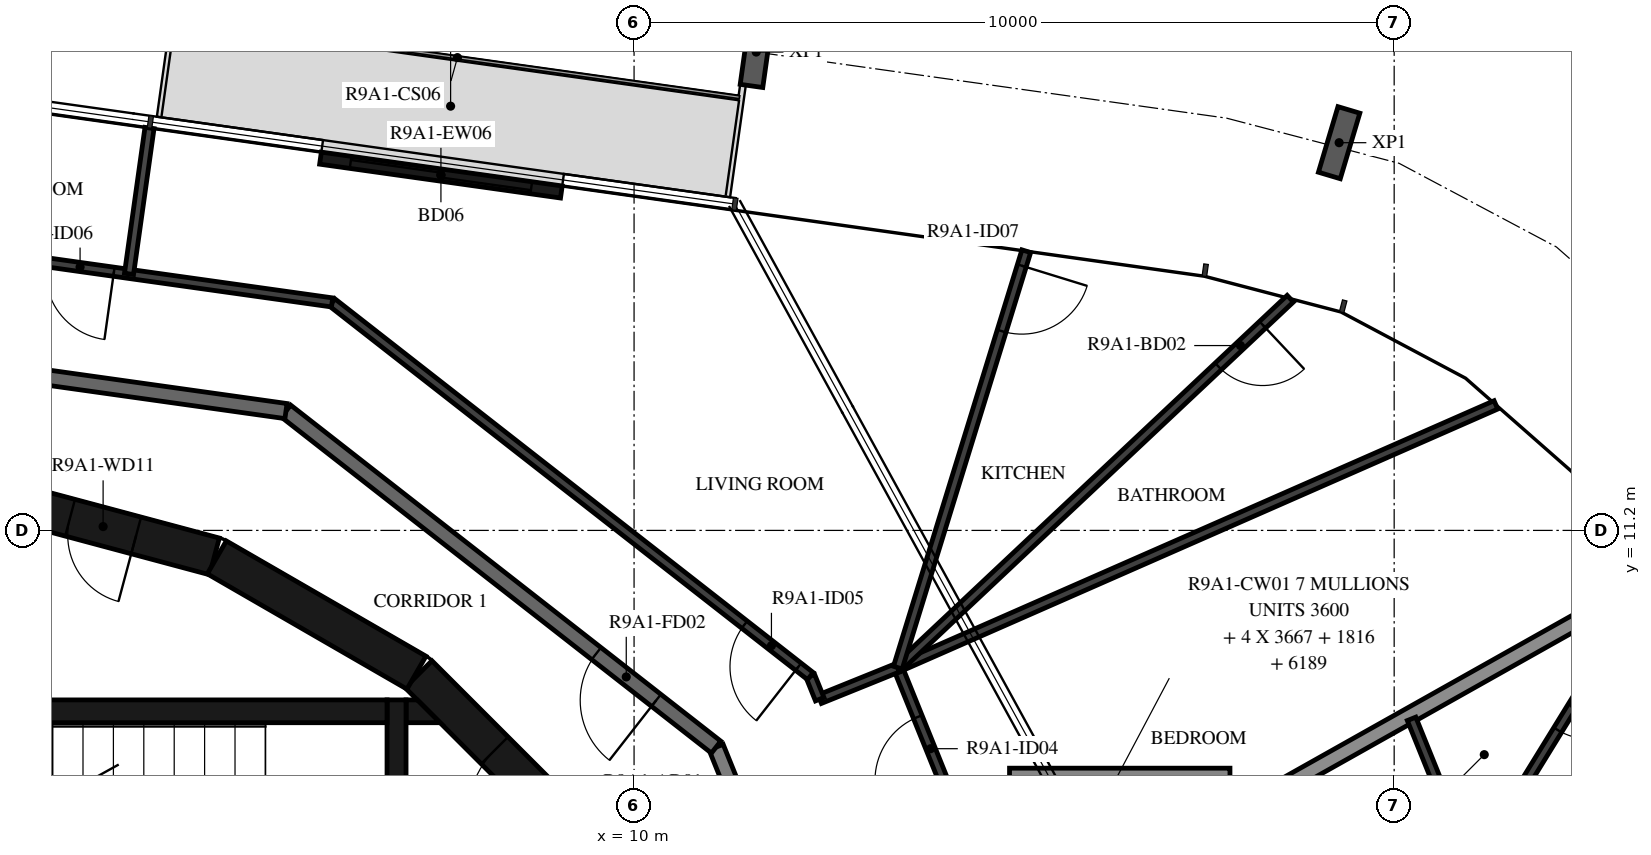
"""IFC4 building model, lengths in metres.
Left out: names, types, materials, properties, quantities, classifications, styles, units other than length and angle.
Written with IfcOpenShell. Run it as: python <this file> out.ifc"""

import sys

from ifc_helpers import new_model, si_unit, direction, frame, frame_2d, origin, origin_2d, place, context, subcontext, project, spatial, polyline, rectangle, i_section, outline, extrude, element, fill, save


model = new_model("IFC4")
c1 = context("Model", 3, precision=1e-05, world=origin(), true_north=direction((0.0, 1.0)))
c2 = subcontext(c1, "Body", "Model", "MODEL_VIEW")
j1 = project(units=[si_unit("LENGTHUNIT", "METRE"), si_unit("PLANEANGLEUNIT", "RADIAN")], contexts=[c1])
p1 = place(None, origin())
s1 = spatial("IfcSite", under=j1, at=p1, CompositionType="ELEMENT")
p2 = place(p1, origin())
s2 = spatial("IfcBuilding", under=s1, at=p2, CompositionType="ELEMENT")
p3 = place(p2, frame((0.0, 0.0, 336.5)))
s3 = spatial("IfcBuildingStorey", under=s2, at=p3, CompositionType="ELEMENT", Elevation=336.5)
for number, where, z_axis, x_axis in (
    (1, (19.276, 16.301, -0.38), (0.0, 0.0, 1.0), (0.958, -0.286, 0.0)),
    (2, (11.607, 17.493, -0.38), (0.0, 0.0, 1.0), (0.99, -0.139, 0.0)),
):
    element("IfcColumn", number, at=place(p3, frame(where, z_axis=z_axis, x_axis=x_axis)), inside=s3, PredefinedType="COLUMN", context=c2, shape_type="SweptSolid", body=[
        extrude(i_section(OverallWidth=0.3, OverallDepth=0.9, WebThickness=0.019, FlangeThickness=0.035, FilletRadius=0.03, at=origin_2d()), origin(), (0.0, 0.0, 1.0), 3.5),
    ])
p4 = place(p3, frame((9.043, 15.652, 0.0), z_axis=(0.0, 0.0, 1.0), x_axis=(-0.990270382149, 0.139156639217, 0.0)))
e3 = element("IfcWall", 3, at=p4, inside=s3, PredefinedType="STANDARD", context=c2, shape_type="SweptSolid", body=[
    extrude(rectangle(XDim=3.2, YDim=0.16, at=frame_2d((1.6, 0.0))), origin(), (0.0, 0.0, 1.0), 3.12),
])
p5 = place(p4, frame((0.4, 0.0, 0.0)))
e4 = element("IfcOpeningElement", 4, at=p5, cuts=e3, PredefinedType="OPENING", context=c2, shape_type="SweptSolid", body=[
    extrude(rectangle(XDim=2.4, YDim=2.4, at=frame_2d((1.2, 1.2))), frame((0.0, 0.09, 0.0), z_axis=(0.0, -1.0, 0.0), x_axis=(1.0, 0.0, 0.0)), (0.0, 0.0, 1.0), 0.18),
])
p6 = place(p3, frame((9.308, 7.164, 0.0), z_axis=(0.0, 0.0, 1.0), x_axis=(-0.707106781187, 0.707106781187, 0.0)))
e5 = element("IfcWall", 5, at=p6, inside=s3, PredefinedType="SHEAR", context=c2, shape_type="SweptSolid", body=[
    extrude(rectangle(XDim=3.032, YDim=0.5, at=frame_2d((1.516, 0.0))), origin(), (0.0, 0.0, 1.0), 3.12),
])
p7 = place(p6, frame((0.416, 0.0, 0.0)))
e6 = element("IfcOpeningElement", 6, at=p7, cuts=e5, PredefinedType="OPENING", context=c2, shape_type="SweptSolid", body=[
    extrude(rectangle(XDim=1.2, YDim=2.1, at=frame_2d((0.6, 1.05))), frame((0.0, 0.26, 0.0), z_axis=(0.0, -1.0, 0.0), x_axis=(1.0, 0.0, 0.0)), (0.0, 0.0, 1.0), 0.52),
])
p8 = place(p3, frame((7.137, 9.329, 0.0), z_axis=(0.0, 0.0, 1.0), x_axis=(-0.865975092491, 0.500087131594, 0.0)))
e7 = element("IfcWall", 7, at=p8, inside=s3, PredefinedType="SHEAR", context=c2, shape_type="SweptSolid", body=[
    extrude(rectangle(XDim=3.033, YDim=0.5, at=frame_2d((1.516, 0.0))), origin(), (0.0, 0.0, 1.0), 3.12),
])
p9 = place(p3, frame((4.479, 10.858, 0.0), z_axis=(0.0, 0.0, 1.0), x_axis=(-0.965948410781, 0.258734743916, 0.0)))
e8 = element("IfcWall", 8, at=p9, inside=s3, PredefinedType="SHEAR", context=c2, shape_type="SweptSolid", body=[
    extrude(rectangle(XDim=3.033, YDim=0.5, at=frame_2d((1.516, 0.0))), origin(), (0.0, 0.0, 1.0), 3.12),
])
p10 = place(p9, frame((1.066, 0.0, 0.0)))
e9 = element("IfcOpeningElement", 9, at=p10, cuts=e8, PredefinedType="OPENING", context=c2, shape_type="SweptSolid", body=[
    extrude(rectangle(XDim=0.9, YDim=2.1, at=frame_2d((0.45, 1.05))), frame((0.0, 0.26, 0.0), z_axis=(0.0, -1.0, 0.0), x_axis=(1.0, 0.0, 0.0)), (0.0, 0.0, 1.0), 0.52),
])
p11 = place(p3, frame((0.0, 8.82, 0.0), z_axis=(0.0, 0.0, 1.0), x_axis=(1.0, 0.0, 0.0)))
e10 = element("IfcWall", 10, at=p11, inside=s3, PredefinedType="SHEAR", context=c2, shape_type="SweptSolid", body=[
    extrude(rectangle(XDim=6.75, YDim=0.3, at=frame_2d((3.375, 0.0))), origin(), (0.0, 0.0, 1.0), 3.12),
])
p12 = place(p3, frame((6.875, 5.05, 0.0), z_axis=(0.0, 0.0, 1.0), x_axis=(0.0, 1.0, 0.0)))
e11 = element("IfcWall", 11, at=p12, inside=s3, PredefinedType="SHEAR", context=c2, shape_type="SweptSolid", body=[
    extrude(rectangle(XDim=3.92, YDim=0.25, at=frame_2d((1.96, 0.0))), origin(), (0.0, 0.0, 1.0), 3.12),
])
p13 = place(p12, frame((1.11, 0.0, 0.0)))
e12 = element("IfcOpeningElement", 12, at=p13, cuts=e11, PredefinedType="OPENING", context=c2, shape_type="SweptSolid", body=[
    extrude(rectangle(XDim=1.2, YDim=2.1, at=frame_2d((0.6, 1.05))), frame((0.0, 0.135, 0.0), z_axis=(0.0, -1.0, 0.0), x_axis=(1.0, 0.0, 0.0)), (0.0, 0.0, 1.0), 0.27),
])
p14 = place(p3, origin())
e13 = element("IfcWall", 13, at=p14, inside=s3, PredefinedType="SHEAR", context=c2, shape_type="SweptSolid", body=[
    extrude(outline(polyline([(7.448, 8.67), (7.0, 8.67), (7.0, 8.97), (7.148, 8.97), (7.448, 8.67)])), origin(), (0.0, 0.0, 1.0), 3.12),
])
p15 = place(p3, frame((13.769, 1.691, 0.0), z_axis=(0.0, 0.0, 1.0), x_axis=(-0.374618189599, 0.92717916932, 0.0)))
e14 = element("IfcWall", 14, at=p15, inside=s3, PredefinedType="STANDARD", context=c2, shape_type="SweptSolid", body=[
    extrude(rectangle(XDim=7.181, YDim=0.2, at=frame_2d((3.591, 0.0))), origin(), (0.0, 0.0, 1.0), 3.12),
])
p16 = place(p15, frame((2.371, 0.0, 0.0)))
e15 = element("IfcOpeningElement", 15, at=p16, cuts=e14, PredefinedType="OPENING", context=c2, shape_type="SweptSolid", body=[
    extrude(rectangle(XDim=1.0, YDim=2.1, at=frame_2d((0.5, 1.05))), frame((0.0, 0.11, 0.0), z_axis=(0.0, -1.0, 0.0), x_axis=(1.0, 0.0, 0.0)), (0.0, 0.0, 1.0), 0.22),
])
p17 = place(p3, frame((11.079, 8.349, 0.0), z_axis=(0.0, 0.0, 1.0), x_axis=(-0.78800478687, 0.615669112324, 0.0)))
e16 = element("IfcWall", 16, at=p17, inside=s3, PredefinedType="STANDARD", context=c2, shape_type="SweptSolid", body=[
    extrude(rectangle(XDim=7.181, YDim=0.2, at=frame_2d((3.591, 0.0))), origin(), (0.0, 0.0, 1.0), 3.12),
])
p18 = place(p17, frame((1.0, 0.0, 0.0)))
e17 = element("IfcOpeningElement", 17, at=p18, cuts=e16, PredefinedType="OPENING", context=c2, shape_type="SweptSolid", body=[
    extrude(rectangle(XDim=1.0, YDim=2.1, at=frame_2d((0.5, 1.05))), frame((0.0, 0.11, 0.0), z_axis=(0.0, -1.0, 0.0), x_axis=(1.0, 0.0, 0.0)), (0.0, 0.0, 1.0), 0.22),
])
p19 = place(p3, frame((5.42, 12.77, 0.0), z_axis=(0.0, 0.0, 1.0), x_axis=(-0.990270565508, 0.139155334385, 0.0)))
e18 = element("IfcWall", 18, at=p19, inside=s3, PredefinedType="STANDARD", context=c2, shape_type="SweptSolid", body=[
    extrude(rectangle(XDim=7.181, YDim=0.2, at=frame_2d((3.59, 0.0))), origin(), (0.0, 0.0, 1.0), 3.12),
])
p20 = place(p3, frame((23.354, 10.537, 0.0), z_axis=(0.0, 0.0, 1.0), x_axis=(-0.871719790551, -0.490004700754, 0.0)))
e19 = element("IfcWall", 19, at=p20, inside=s3, PredefinedType="STANDARD", context=c2, shape_type="SweptSolid", body=[
    extrude(rectangle(XDim=6.326, YDim=0.2, at=frame_2d((3.163, 0.0))), origin(), (0.0, 0.0, 1.0), 2.73),
])
p21 = place(p3, frame((23.357, 10.532, 0.0), z_axis=(0.0, 0.0, 1.0), x_axis=(-0.524476563806, -0.851424884542, 0.0)))
e20 = element("IfcWall", 20, at=p21, inside=s3, PredefinedType="PARTITIONING", context=c2, shape_type="SweptSolid", body=[
    extrude(rectangle(XDim=5.029, YDim=0.12, at=frame_2d((2.515, 0.0))), origin(), (0.0, 0.0, 1.0), 3.12),
])
p22 = place(p21, frame((1.5, 0.0, 0.0)))
e21 = element("IfcOpeningElement", 21, at=p22, cuts=e20, PredefinedType="OPENING", context=c2, shape_type="SweptSolid", body=[
    extrude(rectangle(XDim=0.8, YDim=2.1, at=frame_2d((0.4, 1.05))), frame((0.0, 0.07, 0.0), z_axis=(0.0, -1.0, 0.0), x_axis=(1.0, 0.0, 0.0)), (0.0, 0.0, 1.0), 0.14),
])
p23 = place(p3, frame((20.609, 7.779, 0.0), z_axis=(0.0, 0.0, 1.0), x_axis=(-0.374371668856, 0.927278735633, 0.0)))
e22 = element("IfcWall", 22, at=p23, inside=s3, PredefinedType="PARTITIONING", context=c2, shape_type="SweptSolid", body=[
    extrude(rectangle(XDim=1.016, YDim=0.12, at=frame_2d((0.508, 0.0))), origin(), (0.0, 0.0, 1.0), 3.12),
])
p24 = place(p3, frame((14.406, 7.076, 0.0), z_axis=(0.0, 0.0, 1.0), x_axis=(-0.374503415005, 0.927225534673, 0.0)))
e23 = element("IfcWall", 23, at=p24, inside=s3, PredefinedType="PARTITIONING", context=c2, shape_type="SweptSolid", body=[
    extrude(rectangle(XDim=2.5, YDim=0.12, at=frame_2d((1.25, 0.0))), origin(), (0.0, 0.0, 1.0), 3.12),
])
p25 = place(p24, frame((0.9, 0.0, 0.0)))
e24 = element("IfcOpeningElement", 24, at=p25, cuts=e23, PredefinedType="OPENING", context=c2, shape_type="SweptSolid", body=[
    extrude(rectangle(XDim=0.9, YDim=2.1, at=frame_2d((0.45, 1.05))), frame((0.0, 0.07, 0.0), z_axis=(0.0, -1.0, 0.0), x_axis=(1.0, 0.0, 0.0)), (0.0, 0.0, 1.0), 0.14),
])
p26 = place(p3, frame((13.47, 9.395, 0.0), z_axis=(0.0, 0.0, 1.0), x_axis=(-0.927180061276, -0.374615982003, 0.0)))
e25 = element("IfcWall", 25, at=p26, inside=s3, PredefinedType="PARTITIONING", context=c2, shape_type="SweptSolid", body=[
    extrude(rectangle(XDim=1.109, YDim=0.12, at=frame_2d((0.554, 0.0))), origin(), (0.0, 0.0, 1.0), 3.12),
])
p27 = place(p3, frame((12.442, 8.979, 0.0), z_axis=(0.0, 0.0, 1.0), x_axis=(-0.374979656603, 0.927033039936, 0.0)))
e26 = element("IfcWall", 26, at=p27, inside=s3, PredefinedType="PARTITIONING", context=c2, shape_type="SweptSolid", body=[
    extrude(rectangle(XDim=0.328, YDim=0.12, at=frame_2d((0.164, 0.0))), origin(), (0.0, 0.0, 1.0), 3.12),
])
p28 = place(p3, frame((12.319, 9.283, 0.0), z_axis=(0.0, 0.0, 1.0), x_axis=(-0.788000268464, 0.61567489546, 0.0)))
e27 = element("IfcWall", 27, at=p28, inside=s3, PredefinedType="PARTITIONING", context=c2, shape_type="SweptSolid", body=[
    extrude(rectangle(XDim=7.985, YDim=0.12, at=frame_2d((3.992, 0.0))), origin(), (0.0, 0.0, 1.0), 3.12),
])
p29 = place(p28, frame((0.2, 0.0, 0.0)))
e28 = element("IfcOpeningElement", 28, at=p29, cuts=e27, PredefinedType="OPENING", context=c2, shape_type="SweptSolid", body=[
    extrude(rectangle(XDim=0.9, YDim=2.1, at=frame_2d((0.45, 1.05))), frame((0.0, 0.07, 0.0), z_axis=(0.0, -1.0, 0.0), x_axis=(1.0, 0.0, 0.0)), (0.0, 0.0, 1.0), 0.14),
])
p30 = place(p3, frame((6.027, 14.199, 0.0), z_axis=(0.0, 0.0, 1.0), x_axis=(-0.990271593532, 0.139148018469, 0.0)))
e29 = element("IfcWall", 29, at=p30, inside=s3, PredefinedType="PARTITIONING", context=c2, shape_type="SweptSolid", body=[
    extrude(rectangle(XDim=7.985, YDim=0.12, at=frame_2d((3.992, 0.0))), origin(), (0.0, 0.0, 1.0), 3.12),
])
p31 = place(p30, frame((2.898, 0.0, 0.0)))
e30 = element("IfcOpeningElement", 30, at=p31, cuts=e29, PredefinedType="OPENING", context=c2, shape_type="SweptSolid", body=[
    extrude(rectangle(XDim=0.9, YDim=2.1, at=frame_2d((0.45, 1.05))), frame((0.0, 0.07, 0.0), z_axis=(0.0, -1.0, 0.0), x_axis=(1.0, 0.0, 0.0)), (0.0, 0.0, 1.0), 0.14),
])
p32 = place(p3, frame((21.338, 12.851, 0.0), z_axis=(0.0, 0.0, 1.0), x_axis=(-0.915538158579, -0.402231127818, 0.0)))
e31 = element("IfcWall", 31, at=p32, inside=s3, PredefinedType="PARTITIONING", context=c2, shape_type="SweptSolid", body=[
    extrude(rectangle(XDim=8.594, YDim=0.12, at=frame_2d((4.297, 0.0))), origin(), (0.0, 0.0, 1.0), 3.12),
])
p33 = place(p3, frame((18.633, 14.248, 0.0), z_axis=(0.0, 0.0, 1.0), x_axis=(-0.728595344908, -0.684944394369, 0.0)))
e32 = element("IfcWall", 32, at=p33, inside=s3, PredefinedType="PARTITIONING", context=c2, shape_type="SweptSolid", body=[
    extrude(rectangle(XDim=7.086, YDim=0.12, at=frame_2d((3.543, 0.0))), origin(), (0.0, 0.0, 1.0), 3.12),
])
p34 = place(p33, frame((0.5, 0.0, 0.0)))
e33 = element("IfcOpeningElement", 33, at=p34, cuts=e32, PredefinedType="OPENING", context=c2, shape_type="SweptSolid", body=[
    extrude(rectangle(XDim=0.8, YDim=2.1, at=frame_2d((0.4, 1.05))), frame((0.0, 0.07, 0.0), z_axis=(0.0, -1.0, 0.0), x_axis=(1.0, 0.0, 0.0)), (0.0, 0.0, 1.0), 0.14),
])
p35 = place(p3, frame((15.16, 14.873, 0.0), z_axis=(0.0, 0.0, 1.0), x_axis=(-0.294750051258, -0.955574386055, 0.0)))
e34 = element("IfcWall", 34, at=p35, inside=s3, PredefinedType="PARTITIONING", context=c2, shape_type="SweptSolid", body=[
    extrude(rectangle(XDim=5.733, YDim=0.12, at=frame_2d((2.867, 0.0))), origin(), (0.0, 0.0, 1.0), 3.12),
])
p36 = place(p35, frame((0.2, 0.0, 0.0)))
e35 = element("IfcOpeningElement", 35, at=p36, cuts=e34, PredefinedType="OPENING", context=c2, shape_type="SweptSolid", body=[
    extrude(rectangle(XDim=0.9, YDim=2.1, at=frame_2d((0.45, 1.05))), frame((0.0, 0.07, 0.0), z_axis=(0.0, -1.0, 0.0), x_axis=(1.0, 0.0, 0.0)), (0.0, 0.0, 1.0), 0.14),
])
p37 = place(p3, frame((3.625, 16.494, 0.0), z_axis=(0.0, 0.0, 1.0), x_axis=(-0.139181494832, -0.990266889023, 0.0)))
e36 = element("IfcWall", 36, at=p37, inside=s3, PredefinedType="PARTITIONING", context=c2, shape_type="SweptSolid", body=[
    extrude(rectangle(XDim=1.938, YDim=0.12, at=frame_2d((0.969, 0.0))), origin(), (0.0, 0.0, 1.0), 2.73),
])
p38 = place(p3, origin())
e37 = element("IfcWall", 37, at=p38, inside=s3, PredefinedType="STANDARD", context=c2, shape_type="SweptSolid", body=[
    extrude(outline(polyline([(17.84, 8.072), (17.84, 5.172), (14.94, 5.172), (14.94, 8.072), (17.84, 8.072)]), holes=[polyline([(15.14, 5.372), (17.64, 5.372), (17.64, 7.872), (15.14, 7.872), (15.14, 5.372)])]), origin(), (0.0, 0.0, 1.0), 3.12),
])
p39 = place(p5, origin())
e38 = element("IfcDoor", 38, at=p39, inside=s3, OperationType="DOUBLE_DOOR_SLIDING", PredefinedType="DOOR", context=c2, shape_type="SweptSolid", body=[
    extrude(rectangle(XDim=2.4, YDim=2.4, at=frame_2d((1.2, 1.2))), frame((0.0, 0.025, 0.0), z_axis=(0.0, -1.0, 0.0), x_axis=(1.0, 0.0, 0.0)), (0.0, 0.0, 1.0), 0.05),
])
fill(e4, e38)
p40 = place(p7, origin())
e39 = element("IfcDoor", 39, at=p40, inside=s3, OperationType="SINGLE_SWING_RIGHT", PredefinedType="DOOR", context=c2, shape_type="SweptSolid", body=[
    extrude(rectangle(XDim=1.2, YDim=2.1, at=frame_2d((0.6, 1.05))), frame((0.0, 0.025, 0.0), z_axis=(0.0, -1.0, 0.0), x_axis=(1.0, 0.0, 0.0)), (0.0, 0.0, 1.0), 0.05),
])
fill(e6, e39)
p41 = place(p10, origin())
e40 = element("IfcDoor", 40, at=p41, inside=s3, OperationType="SINGLE_SWING_LEFT", PredefinedType="DOOR", context=c2, shape_type="SweptSolid", body=[
    extrude(rectangle(XDim=0.9, YDim=2.1, at=frame_2d((0.45, 1.05))), frame((0.0, 0.025, 0.0), z_axis=(0.0, -1.0, 0.0), x_axis=(1.0, 0.0, 0.0)), (0.0, 0.0, 1.0), 0.05),
])
fill(e9, e40)
p42 = place(p22, origin())
e41 = element("IfcDoor", 41, at=p42, inside=s3, OperationType="SINGLE_SWING_RIGHT", PredefinedType="DOOR", context=c2, shape_type="SweptSolid", body=[
    extrude(rectangle(XDim=0.8, YDim=2.1, at=frame_2d((0.4, 1.05))), frame((0.0, 0.025, 0.0), z_axis=(0.0, -1.0, 0.0), x_axis=(1.0, 0.0, 0.0)), (0.0, 0.0, 1.0), 0.05),
])
fill(e21, e41)
p43 = place(p18, origin())
e42 = element("IfcDoor", 42, at=p43, inside=s3, OperationType="SINGLE_SWING_LEFT", PredefinedType="DOOR", context=c2, shape_type="SweptSolid", body=[
    extrude(rectangle(XDim=1.0, YDim=2.1, at=frame_2d((0.5, 1.05))), frame((0.0, 0.025, 0.0), z_axis=(0.0, -1.0, 0.0), x_axis=(1.0, 0.0, 0.0)), (0.0, 0.0, 1.0), 0.05),
])
fill(e17, e42)
p44 = place(p25, origin())
e43 = element("IfcDoor", 43, at=p44, inside=s3, OperationType="SINGLE_SWING_LEFT", PredefinedType="DOOR", context=c2, shape_type="SweptSolid", body=[
    extrude(rectangle(XDim=0.9, YDim=2.1, at=frame_2d((0.45, 1.05))), frame((0.0, 0.025, 0.0), z_axis=(0.0, -1.0, 0.0), x_axis=(1.0, 0.0, 0.0)), (0.0, 0.0, 1.0), 0.05),
])
fill(e24, e43)
p45 = place(p29, origin())
e44 = element("IfcDoor", 44, at=p45, inside=s3, OperationType="SINGLE_SWING_LEFT", PredefinedType="DOOR", context=c2, shape_type="SweptSolid", body=[
    extrude(rectangle(XDim=0.9, YDim=2.1, at=frame_2d((0.45, 1.05))), frame((0.0, 0.025, 0.0), z_axis=(0.0, -1.0, 0.0), x_axis=(1.0, 0.0, 0.0)), (0.0, 0.0, 1.0), 0.05),
])
fill(e28, e44)
p46 = place(p31, origin())
e45 = element("IfcDoor", 45, at=p46, inside=s3, OperationType="SINGLE_SWING_LEFT", PredefinedType="DOOR", context=c2, shape_type="SweptSolid", body=[
    extrude(rectangle(XDim=0.9, YDim=2.1, at=frame_2d((0.45, 1.05))), frame((0.0, 0.025, 0.0), z_axis=(0.0, -1.0, 0.0), x_axis=(1.0, 0.0, 0.0)), (0.0, 0.0, 1.0), 0.05),
])
fill(e30, e45)
p47 = place(p36, origin())
e46 = element("IfcDoor", 46, at=p47, inside=s3, OperationType="SINGLE_SWING_LEFT", PredefinedType="DOOR", context=c2, shape_type="SweptSolid", body=[
    extrude(rectangle(XDim=0.9, YDim=2.1, at=frame_2d((0.45, 1.05))), frame((0.0, 0.025, 0.0), z_axis=(0.0, -1.0, 0.0), x_axis=(1.0, 0.0, 0.0)), (0.0, 0.0, 1.0), 0.05),
])
fill(e35, e46)
p48 = place(p34, origin())
e47 = element("IfcDoor", 47, at=p48, inside=s3, OperationType="SINGLE_SWING_LEFT", PredefinedType="DOOR", context=c2, shape_type="SweptSolid", body=[
    extrude(rectangle(XDim=0.8, YDim=2.1, at=frame_2d((0.4, 1.05))), frame((0.0, 0.025, 0.0), z_axis=(0.0, -1.0, 0.0), x_axis=(1.0, 0.0, 0.0)), (0.0, 0.0, 1.0), 0.05),
])
fill(e33, e47)
save(model, sys.argv[1])
